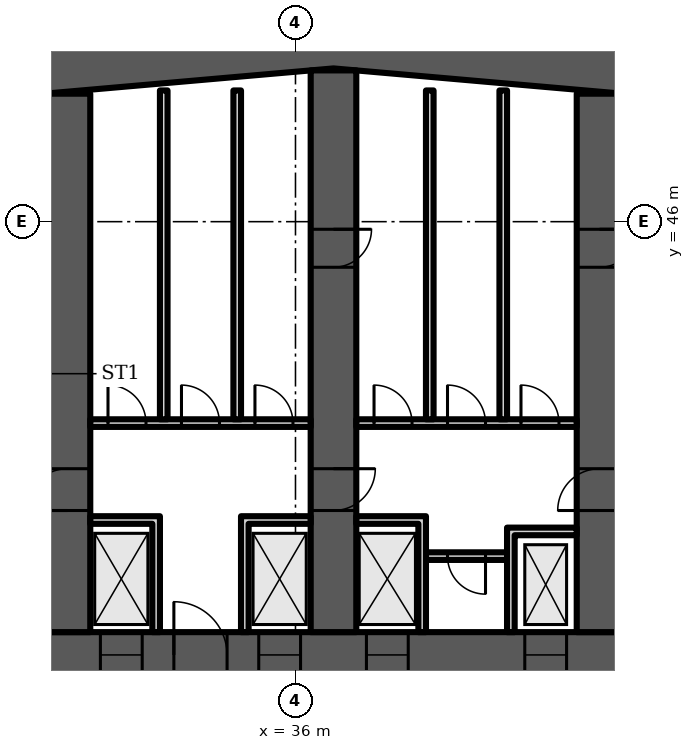
"""IFC4 building model, lengths in metres.
Left out: names, types, materials, properties, quantities, classifications, styles, units other than length and angle.
Written with IfcOpenShell. Run it as: python <this file> out.ifc"""

import sys

from ifc_helpers import new_model, si_unit, direction, frame, frame_2d, origin, place, context, subcontext, project, spatial, polyline, rectangle, outline, extrude, element, fill, save


model = new_model("IFC4")
c1 = context("Model", 3, precision=1e-05, world=origin(), true_north=direction((0.0, 1.0)))
c2 = subcontext(c1, "Body", "Model", "MODEL_VIEW")
j1 = project(units=[si_unit("LENGTHUNIT", "METRE"), si_unit("PLANEANGLEUNIT", "RADIAN")], contexts=[c1])
p1 = place(None, origin())
s1 = spatial("IfcSite", under=j1, at=p1, CompositionType="ELEMENT")
p2 = place(p1, origin())
s2 = spatial("IfcBuilding", under=s1, at=p2, CompositionType="ELEMENT")
p3 = place(p2, frame((0.0, 0.0, 73.9)))
s3 = spatial("IfcBuildingStorey", under=s2, at=p3, CompositionType="ELEMENT", Elevation=73.9)
p4 = place(p3, origin())
e1 = element("IfcWall", 1, at=p4, inside=s3, PredefinedType="SHEAR", context=c2, shape_type="SweptSolid", body=[
    extrude(outline(polyline([(9.0, 47.583), (37.0, 50.032), (65.0, 47.583), (65.0, 48.787), (37.0, 51.237), (9.0, 48.787), (9.0, 47.583)])), origin(), (0.0, 0.0, 1.0), 3.6),
])
p5 = place(p3, frame((9.0, 34.6, 0.0), z_axis=(0.0, 0.0, 1.0), x_axis=(1.0, 0.0, 0.0)))
e2 = element("IfcWall", 2, at=p5, inside=s3, PredefinedType="SHEAR", context=c2, shape_type="SweptSolid", body=[
    extrude(rectangle(XDim=56.0, YDim=1.2, at=frame_2d((28.0, 0.0))), origin(), (0.0, 0.0, 1.0), 3.6),
])
p6 = place(p5, frame((2.0, 0.0, 0.0)))
e3 = element("IfcOpeningElement", 3, at=p6, cuts=e2, PredefinedType="OPENING", context=c2, shape_type="SweptSolid", body=[
    extrude(rectangle(XDim=1.0, YDim=2.1, at=frame_2d((0.5, 1.05))), frame((0.0, 0.61, 0.0), z_axis=(0.0, -1.0, 0.0), x_axis=(1.0, 0.0, 0.0)), (0.0, 0.0, 1.0), 1.22),
])
p7 = place(p5, frame((4.6, 0.0, 0.0)))
e4 = element("IfcOpeningElement", 4, at=p7, cuts=e2, PredefinedType="OPENING", context=c2, shape_type="SweptSolid", body=[
    extrude(rectangle(XDim=1.0, YDim=2.1, at=frame_2d((0.5, 1.05))), frame((0.0, 0.61, 0.0), z_axis=(0.0, -1.0, 0.0), x_axis=(1.0, 0.0, 0.0)), (0.0, 0.0, 1.0), 1.22),
])
p8 = place(p5, frame((7.867, 0.0, 0.0)))
e5 = element("IfcOpeningElement", 5, at=p8, cuts=e2, PredefinedType="OPENING", context=c2, shape_type="SweptSolid", body=[
    extrude(rectangle(XDim=1.1, YDim=2.1, at=frame_2d((0.55, 1.05))), frame((0.0, 0.61, 0.0), z_axis=(0.0, -1.0, 0.0), x_axis=(1.0, 0.0, 0.0)), (0.0, 0.0, 1.0), 1.22),
])
p9 = place(p5, frame((12.033, 0.0, 0.0)))
e6 = element("IfcOpeningElement", 6, at=p9, cuts=e2, PredefinedType="OPENING", context=c2, shape_type="SweptSolid", body=[
    extrude(rectangle(XDim=1.1, YDim=2.1, at=frame_2d((0.55, 1.05))), frame((0.0, 0.61, 0.0), z_axis=(0.0, -1.0, 0.0), x_axis=(1.0, 0.0, 0.0)), (0.0, 0.0, 1.0), 1.22),
])
p10 = place(p5, frame((9.8, 0.0, 0.0)))
e7 = element("IfcOpeningElement", 7, at=p10, cuts=e2, PredefinedType="OPENING", context=c2, shape_type="SweptSolid", body=[
    extrude(rectangle(XDim=1.4, YDim=2.1, at=frame_2d((0.7, 1.05))), frame((0.0, 0.61, 0.0), z_axis=(0.0, -1.0, 0.0), x_axis=(1.0, 0.0, 0.0)), (0.0, 0.0, 1.0), 1.22),
])
p11 = place(p5, frame((14.65, 0.0, 0.0)))
e8 = element("IfcOpeningElement", 8, at=p11, cuts=e2, PredefinedType="OPENING", context=c2, shape_type="SweptSolid", body=[
    extrude(rectangle(XDim=1.2, YDim=2.1, at=frame_2d((0.6, 1.05))), frame((0.0, 0.61, 0.0), z_axis=(0.0, -1.0, 0.0), x_axis=(1.0, 0.0, 0.0)), (0.0, 0.0, 1.0), 1.22),
])
p12 = place(p5, frame((21.867, 0.0, 0.0)))
e9 = element("IfcOpeningElement", 9, at=p12, cuts=e2, PredefinedType="OPENING", context=c2, shape_type="SweptSolid", body=[
    extrude(rectangle(XDim=1.1, YDim=2.1, at=frame_2d((0.55, 1.05))), frame((0.0, 0.61, 0.0), z_axis=(0.0, -1.0, 0.0), x_axis=(1.0, 0.0, 0.0)), (0.0, 0.0, 1.0), 1.22),
])
p13 = place(p5, frame((26.033, 0.0, 0.0)))
e10 = element("IfcOpeningElement", 10, at=p13, cuts=e2, PredefinedType="OPENING", context=c2, shape_type="SweptSolid", body=[
    extrude(rectangle(XDim=1.1, YDim=2.1, at=frame_2d((0.55, 1.05))), frame((0.0, 0.61, 0.0), z_axis=(0.0, -1.0, 0.0), x_axis=(1.0, 0.0, 0.0)), (0.0, 0.0, 1.0), 1.22),
])
p14 = place(p5, frame((23.8, 0.0, 0.0)))
e11 = element("IfcOpeningElement", 11, at=p14, cuts=e2, PredefinedType="OPENING", context=c2, shape_type="SweptSolid", body=[
    extrude(rectangle(XDim=1.4, YDim=2.1, at=frame_2d((0.7, 1.05))), frame((0.0, 0.61, 0.0), z_axis=(0.0, -1.0, 0.0), x_axis=(1.0, 0.0, 0.0)), (0.0, 0.0, 1.0), 1.22),
])
p15 = place(p5, frame((28.867, 0.0, 0.0)))
e12 = element("IfcOpeningElement", 12, at=p15, cuts=e2, PredefinedType="OPENING", context=c2, shape_type="SweptSolid", body=[
    extrude(rectangle(XDim=1.1, YDim=2.1, at=frame_2d((0.55, 1.05))), frame((0.0, 0.61, 0.0), z_axis=(0.0, -1.0, 0.0), x_axis=(1.0, 0.0, 0.0)), (0.0, 0.0, 1.0), 1.22),
])
p16 = place(p5, frame((33.033, 0.0, 0.0)))
e13 = element("IfcOpeningElement", 13, at=p16, cuts=e2, PredefinedType="OPENING", context=c2, shape_type="SweptSolid", body=[
    extrude(rectangle(XDim=1.1, YDim=2.1, at=frame_2d((0.55, 1.05))), frame((0.0, 0.61, 0.0), z_axis=(0.0, -1.0, 0.0), x_axis=(1.0, 0.0, 0.0)), (0.0, 0.0, 1.0), 1.22),
])
p17 = place(p5, frame((40.15, 0.0, 0.0)))
e14 = element("IfcOpeningElement", 14, at=p17, cuts=e2, PredefinedType="OPENING", context=c2, shape_type="SweptSolid", body=[
    extrude(rectangle(XDim=1.2, YDim=2.1, at=frame_2d((0.6, 1.05))), frame((0.0, 0.61, 0.0), z_axis=(0.0, -1.0, 0.0), x_axis=(1.0, 0.0, 0.0)), (0.0, 0.0, 1.0), 1.22),
])
p18 = place(p5, frame((44.8, 0.0, 0.0)))
e15 = element("IfcOpeningElement", 15, at=p18, cuts=e2, PredefinedType="OPENING", context=c2, shape_type="SweptSolid", body=[
    extrude(rectangle(XDim=1.4, YDim=2.1, at=frame_2d((0.7, 1.05))), frame((0.0, 0.61, 0.0), z_axis=(0.0, -1.0, 0.0), x_axis=(1.0, 0.0, 0.0)), (0.0, 0.0, 1.0), 1.22),
])
p19 = place(p5, frame((49.867, 0.0, 0.0)))
e16 = element("IfcOpeningElement", 16, at=p19, cuts=e2, PredefinedType="OPENING", context=c2, shape_type="SweptSolid", body=[
    extrude(rectangle(XDim=1.1, YDim=2.1, at=frame_2d((0.55, 1.05))), frame((0.0, 0.61, 0.0), z_axis=(0.0, -1.0, 0.0), x_axis=(1.0, 0.0, 0.0)), (0.0, 0.0, 1.0), 1.22),
])
p20 = place(p5, frame((53.5, 0.0, 0.0)))
e17 = element("IfcOpeningElement", 17, at=p20, cuts=e2, PredefinedType="OPENING", context=c2, shape_type="SweptSolid", body=[
    extrude(rectangle(XDim=1.1, YDim=2.1, at=frame_2d((0.55, 1.05))), frame((0.0, 0.61, 0.0), z_axis=(0.0, -1.0, 0.0), x_axis=(1.0, 0.0, 0.0)), (0.0, 0.0, 1.0), 1.22),
])
p21 = place(p5, frame((51.567, 0.0, 0.0)))
e18 = element("IfcOpeningElement", 18, at=p21, cuts=e2, PredefinedType="OPENING", context=c2, shape_type="SweptSolid", body=[
    extrude(rectangle(XDim=1.4, YDim=2.1, at=frame_2d((0.7, 1.05))), frame((0.0, 0.61, 0.0), z_axis=(0.0, -1.0, 0.0), x_axis=(1.0, 0.0, 0.0)), (0.0, 0.0, 1.0), 1.22),
])
p22 = place(p3, frame((30.0, 35.2, 0.0), z_axis=(0.0, 0.0, 1.0), x_axis=(0.0, 1.0, 0.0)))
e19 = element("IfcWall", 19, at=p22, inside=s3, PredefinedType="SHEAR", context=c2, shape_type="SweptSolid", body=[
    extrude(rectangle(XDim=14.168, YDim=1.2, at=frame_2d((7.084, 0.0))), origin(), (0.0, 0.0, 1.0), 3.6),
])
p23 = place(p22, frame((3.2, 0.0, 0.0)))
e20 = element("IfcOpeningElement", 20, at=p23, cuts=e19, PredefinedType="OPENING", context=c2, shape_type="SweptSolid", body=[
    extrude(rectangle(XDim=1.1, YDim=2.1, at=frame_2d((0.55, 1.05))), frame((0.0, 0.61, 0.0), z_axis=(0.0, -1.0, 0.0), x_axis=(1.0, 0.0, 0.0)), (0.0, 0.0, 1.0), 1.22),
])
p24 = place(p3, frame((37.0, 35.2, 0.0), z_axis=(0.0, 0.0, 1.0), x_axis=(0.0, 1.0, 0.0)))
e21 = element("IfcWall", 21, at=p24, inside=s3, PredefinedType="SHEAR", context=c2, shape_type="SweptSolid", body=[
    extrude(rectangle(XDim=14.78, YDim=1.2, at=frame_2d((7.39, 0.0))), origin(), (0.0, 0.0, 1.0), 3.6),
])
p25 = place(p24, frame((3.2, 0.0, 0.0)))
e22 = element("IfcOpeningElement", 22, at=p25, cuts=e21, PredefinedType="OPENING", context=c2, shape_type="SweptSolid", body=[
    extrude(rectangle(XDim=1.1, YDim=2.1, at=frame_2d((0.55, 1.05))), frame((0.0, 0.61, 0.0), z_axis=(0.0, -1.0, 0.0), x_axis=(1.0, 0.0, 0.0)), (0.0, 0.0, 1.0), 1.22),
])
p26 = place(p24, frame((9.6, 0.0, 0.0)))
e23 = element("IfcOpeningElement", 23, at=p26, cuts=e21, PredefinedType="OPENING", context=c2, shape_type="SweptSolid", body=[
    extrude(rectangle(XDim=1.0, YDim=2.1, at=frame_2d((0.5, 1.05))), frame((0.0, 0.61, 0.0), z_axis=(0.0, -1.0, 0.0), x_axis=(1.0, 0.0, 0.0)), (0.0, 0.0, 1.0), 1.22),
])
p27 = place(p3, frame((44.0, 35.2, 0.0), z_axis=(0.0, 0.0, 1.0), x_axis=(0.0, 1.0, 0.0)))
e24 = element("IfcWall", 24, at=p27, inside=s3, PredefinedType="SHEAR", context=c2, shape_type="SweptSolid", body=[
    extrude(rectangle(XDim=14.168, YDim=1.2, at=frame_2d((7.084, 0.0))), origin(), (0.0, 0.0, 1.0), 3.6),
])
p28 = place(p27, frame((3.2, 0.0, 0.0)))
e25 = element("IfcOpeningElement", 25, at=p28, cuts=e24, PredefinedType="OPENING", context=c2, shape_type="SweptSolid", body=[
    extrude(rectangle(XDim=1.1, YDim=2.1, at=frame_2d((0.55, 1.05))), frame((0.0, 0.61, 0.0), z_axis=(0.0, -1.0, 0.0), x_axis=(1.0, 0.0, 0.0)), (0.0, 0.0, 1.0), 1.22),
])
p29 = place(p27, frame((9.6, 0.0, 0.0)))
e26 = element("IfcOpeningElement", 26, at=p29, cuts=e24, PredefinedType="OPENING", context=c2, shape_type="SweptSolid", body=[
    extrude(rectangle(XDim=1.0, YDim=2.1, at=frame_2d((0.5, 1.05))), frame((0.0, 0.61, 0.0), z_axis=(0.0, -1.0, 0.0), x_axis=(1.0, 0.0, 0.0)), (0.0, 0.0, 1.0), 1.22),
])
p30 = place(p3, frame((30.6, 40.7, 0.0), z_axis=(0.0, 0.0, 1.0), x_axis=(1.0, 0.0, 0.0)))
e27 = element("IfcWall", 27, at=p30, inside=s3, PredefinedType="PARTITIONING", context=c2, shape_type="SweptSolid", body=[
    extrude(rectangle(XDim=5.8, YDim=0.2, at=frame_2d((2.9, 0.0))), origin(), (0.0, 0.0, 1.0), 3.2),
])
p31 = place(p30, frame((0.467, 0.0, 0.0)))
e28 = element("IfcOpeningElement", 28, at=p31, cuts=e27, PredefinedType="OPENING", context=c2, shape_type="SweptSolid", body=[
    extrude(rectangle(XDim=1.0, YDim=2.1, at=frame_2d((0.5, 1.05))), frame((0.0, 0.11, 0.0), z_axis=(0.0, -1.0, 0.0), x_axis=(1.0, 0.0, 0.0)), (0.0, 0.0, 1.0), 0.22),
])
p32 = place(p30, frame((2.4, 0.0, 0.0)))
e29 = element("IfcOpeningElement", 29, at=p32, cuts=e27, PredefinedType="OPENING", context=c2, shape_type="SweptSolid", body=[
    extrude(rectangle(XDim=1.0, YDim=2.1, at=frame_2d((0.5, 1.05))), frame((0.0, 0.11, 0.0), z_axis=(0.0, -1.0, 0.0), x_axis=(1.0, 0.0, 0.0)), (0.0, 0.0, 1.0), 0.22),
])
p33 = place(p30, frame((4.333, 0.0, 0.0)))
e30 = element("IfcOpeningElement", 30, at=p33, cuts=e27, PredefinedType="OPENING", context=c2, shape_type="SweptSolid", body=[
    extrude(rectangle(XDim=1.0, YDim=2.1, at=frame_2d((0.5, 1.05))), frame((0.0, 0.11, 0.0), z_axis=(0.0, -1.0, 0.0), x_axis=(1.0, 0.0, 0.0)), (0.0, 0.0, 1.0), 0.22),
])
p34 = place(p3, origin())
e31 = element("IfcWall", 31, at=p34, inside=s3, PredefinedType="PARTITIONING", context=c2, shape_type="SweptSolid", body=[
    extrude(outline(polyline([(32.233, 38.05), (30.6, 38.05), (30.6, 38.25), (32.233, 38.25), (32.433, 38.25), (32.433, 35.2), (32.233, 35.2), (32.233, 38.05)])), origin(), (0.0, 0.0, 1.0), 3.2),
])
p35 = place(p3, origin())
e32 = element("IfcWall", 32, at=p35, inside=s3, PredefinedType="PARTITIONING", context=c2, shape_type="SweptSolid", body=[
    extrude(outline(polyline([(34.567, 38.25), (34.767, 38.25), (36.4, 38.25), (36.4, 38.05), (34.767, 38.05), (34.767, 35.2), (34.567, 35.2), (34.567, 38.25)])), origin(), (0.0, 0.0, 1.0), 3.2),
])
for number, where, z_axis, x_axis in (
    (33, (32.533, 40.8, 0.0), (0.0, 0.0, 1.0), (0.0, 1.0, 0.0)),
    (34, (34.467, 40.8, 0.0), (0.0, 0.0, 1.0), (0.0, 1.0, 0.0)),
):
    element("IfcWall", number, at=place(p3, frame(where, z_axis=z_axis, x_axis=x_axis)), inside=s3, PredefinedType="PARTITIONING", context=c2, shape_type="SweptSolid", body=[
        extrude(rectangle(XDim=8.653, YDim=0.2, at=frame_2d((4.326, 0.0))), origin(), (0.0, 0.0, 1.0), 3.2),
    ])
p36 = place(p3, frame((39.433, 37.2, 0.0), z_axis=(0.0, 0.0, 1.0), x_axis=(1.0, 0.0, 0.0)))
e35 = element("IfcWall", 35, at=p36, inside=s3, PredefinedType="PARTITIONING", context=c2, shape_type="SweptSolid", body=[
    extrude(rectangle(XDim=2.133, YDim=0.2, at=frame_2d((1.067, 0.0))), origin(), (0.0, 0.0, 1.0), 3.2),
])
p37 = place(p36, frame((0.567, 0.0, 0.0)))
e36 = element("IfcOpeningElement", 36, at=p37, cuts=e35, PredefinedType="OPENING", context=c2, shape_type="SweptSolid", body=[
    extrude(rectangle(XDim=1.0, YDim=2.1, at=frame_2d((0.5, 1.05))), frame((0.0, 0.11, 0.0), z_axis=(0.0, -1.0, 0.0), x_axis=(1.0, 0.0, 0.0)), (0.0, 0.0, 1.0), 0.22),
])
p38 = place(p3, frame((37.6, 40.7, 0.0), z_axis=(0.0, 0.0, 1.0), x_axis=(1.0, 0.0, 0.0)))
e37 = element("IfcWall", 37, at=p38, inside=s3, PredefinedType="PARTITIONING", context=c2, shape_type="SweptSolid", body=[
    extrude(rectangle(XDim=5.8, YDim=0.2, at=frame_2d((2.9, 0.0))), origin(), (0.0, 0.0, 1.0), 3.2),
])
p39 = place(p38, frame((0.467, 0.0, 0.0)))
e38 = element("IfcOpeningElement", 38, at=p39, cuts=e37, PredefinedType="OPENING", context=c2, shape_type="SweptSolid", body=[
    extrude(rectangle(XDim=1.0, YDim=2.1, at=frame_2d((0.5, 1.05))), frame((0.0, 0.11, 0.0), z_axis=(0.0, -1.0, 0.0), x_axis=(1.0, 0.0, 0.0)), (0.0, 0.0, 1.0), 0.22),
])
p40 = place(p38, frame((2.4, 0.0, 0.0)))
e39 = element("IfcOpeningElement", 39, at=p40, cuts=e37, PredefinedType="OPENING", context=c2, shape_type="SweptSolid", body=[
    extrude(rectangle(XDim=1.0, YDim=2.1, at=frame_2d((0.5, 1.05))), frame((0.0, 0.11, 0.0), z_axis=(0.0, -1.0, 0.0), x_axis=(1.0, 0.0, 0.0)), (0.0, 0.0, 1.0), 0.22),
])
p41 = place(p38, frame((4.333, 0.0, 0.0)))
e40 = element("IfcOpeningElement", 40, at=p41, cuts=e37, PredefinedType="OPENING", context=c2, shape_type="SweptSolid", body=[
    extrude(rectangle(XDim=1.0, YDim=2.1, at=frame_2d((0.5, 1.05))), frame((0.0, 0.11, 0.0), z_axis=(0.0, -1.0, 0.0), x_axis=(1.0, 0.0, 0.0)), (0.0, 0.0, 1.0), 0.22),
])
p42 = place(p3, origin())
e41 = element("IfcWall", 41, at=p42, inside=s3, PredefinedType="PARTITIONING", context=c2, shape_type="SweptSolid", body=[
    extrude(outline(polyline([(41.567, 37.95), (41.767, 37.95), (43.4, 37.95), (43.4, 37.75), (41.767, 37.75), (41.767, 35.2), (41.567, 35.2), (41.567, 37.95)])), origin(), (0.0, 0.0, 1.0), 3.2),
])
p43 = place(p3, origin())
e42 = element("IfcWall", 42, at=p43, inside=s3, PredefinedType="PARTITIONING", context=c2, shape_type="SweptSolid", body=[
    extrude(outline(polyline([(39.233, 38.05), (37.6, 38.05), (37.6, 38.25), (39.233, 38.25), (39.433, 38.25), (39.433, 35.2), (39.233, 35.2), (39.233, 38.05)])), origin(), (0.0, 0.0, 1.0), 3.2),
])
for number, where, z_axis, x_axis in (
    (43, (39.533, 40.8, 0.0), (0.0, 0.0, 1.0), (0.0, 1.0, 0.0)),
    (44, (41.467, 40.8, 0.0), (0.0, 0.0, 1.0), (0.0, 1.0, 0.0)),
):
    element("IfcWall", number, at=place(p3, frame(where, z_axis=z_axis, x_axis=x_axis)), inside=s3, PredefinedType="PARTITIONING", context=c2, shape_type="SweptSolid", body=[
        extrude(rectangle(XDim=8.653, YDim=0.2, at=frame_2d((4.326, 0.0))), origin(), (0.0, 0.0, 1.0), 3.2),
    ])
p44 = place(p12, origin())
e45 = element("IfcDoor", 45, at=p44, inside=s3, OperationType="DOUBLE_DOOR_SLIDING", PredefinedType="DOOR", context=c2, shape_type="SweptSolid", body=[
    extrude(rectangle(XDim=1.1, YDim=2.1, at=frame_2d((0.55, 1.05))), frame((0.0, 0.025, 0.0), z_axis=(0.0, -1.0, 0.0), x_axis=(1.0, 0.0, 0.0)), (0.0, 0.0, 1.0), 0.05),
])
fill(e9, e45)
p45 = place(p13, origin())
e46 = element("IfcDoor", 46, at=p45, inside=s3, OperationType="DOUBLE_DOOR_SLIDING", PredefinedType="DOOR", context=c2, shape_type="SweptSolid", body=[
    extrude(rectangle(XDim=1.1, YDim=2.1, at=frame_2d((0.55, 1.05))), frame((0.0, 0.025, 0.0), z_axis=(0.0, -1.0, 0.0), x_axis=(1.0, 0.0, 0.0)), (0.0, 0.0, 1.0), 0.05),
])
fill(e10, e46)
p46 = place(p14, origin())
e47 = element("IfcDoor", 47, at=p46, inside=s3, OperationType="DOUBLE_DOOR_SINGLE_SWING", PredefinedType="DOOR", context=c2, shape_type="SweptSolid", body=[
    extrude(rectangle(XDim=1.4, YDim=2.1, at=frame_2d((0.7, 1.05))), frame((0.0, 0.025, 0.0), z_axis=(0.0, -1.0, 0.0), x_axis=(1.0, 0.0, 0.0)), (0.0, 0.0, 1.0), 0.05),
])
fill(e11, e47)
p47 = place(p31, origin())
e48 = element("IfcDoor", 48, at=p47, inside=s3, OperationType="SINGLE_SWING_LEFT", PredefinedType="DOOR", context=c2, shape_type="SweptSolid", body=[
    extrude(rectangle(XDim=1.0, YDim=2.1, at=frame_2d((0.5, 1.05))), frame((0.0, 0.025, 0.0), z_axis=(0.0, -1.0, 0.0), x_axis=(1.0, 0.0, 0.0)), (0.0, 0.0, 1.0), 0.05),
])
fill(e28, e48)
p48 = place(p32, origin())
e49 = element("IfcDoor", 49, at=p48, inside=s3, OperationType="SINGLE_SWING_LEFT", PredefinedType="DOOR", context=c2, shape_type="SweptSolid", body=[
    extrude(rectangle(XDim=1.0, YDim=2.1, at=frame_2d((0.5, 1.05))), frame((0.0, 0.025, 0.0), z_axis=(0.0, -1.0, 0.0), x_axis=(1.0, 0.0, 0.0)), (0.0, 0.0, 1.0), 0.05),
])
fill(e29, e49)
p49 = place(p33, origin())
e50 = element("IfcDoor", 50, at=p49, inside=s3, OperationType="SINGLE_SWING_LEFT", PredefinedType="DOOR", context=c2, shape_type="SweptSolid", body=[
    extrude(rectangle(XDim=1.0, YDim=2.1, at=frame_2d((0.5, 1.05))), frame((0.0, 0.025, 0.0), z_axis=(0.0, -1.0, 0.0), x_axis=(1.0, 0.0, 0.0)), (0.0, 0.0, 1.0), 0.05),
])
fill(e30, e50)
p50 = place(p37, origin())
e51 = element("IfcDoor", 51, at=p50, inside=s3, OperationType="SINGLE_SWING_RIGHT", PredefinedType="DOOR", context=c2, shape_type="SweptSolid", body=[
    extrude(rectangle(XDim=1.0, YDim=2.1, at=frame_2d((0.5, 1.05))), frame((0.0, 0.025, 0.0), z_axis=(0.0, -1.0, 0.0), x_axis=(1.0, 0.0, 0.0)), (0.0, 0.0, 1.0), 0.05),
])
fill(e36, e51)
p51 = place(p15, origin())
e52 = element("IfcDoor", 52, at=p51, inside=s3, OperationType="DOUBLE_DOOR_SLIDING", PredefinedType="DOOR", context=c2, shape_type="SweptSolid", body=[
    extrude(rectangle(XDim=1.1, YDim=2.1, at=frame_2d((0.55, 1.05))), frame((0.0, 0.025, 0.0), z_axis=(0.0, -1.0, 0.0), x_axis=(1.0, 0.0, 0.0)), (0.0, 0.0, 1.0), 0.05),
])
fill(e12, e52)
p52 = place(p16, origin())
e53 = element("IfcDoor", 53, at=p52, inside=s3, OperationType="DOUBLE_DOOR_SLIDING", PredefinedType="DOOR", context=c2, shape_type="SweptSolid", body=[
    extrude(rectangle(XDim=1.1, YDim=2.1, at=frame_2d((0.55, 1.05))), frame((0.0, 0.025, 0.0), z_axis=(0.0, -1.0, 0.0), x_axis=(1.0, 0.0, 0.0)), (0.0, 0.0, 1.0), 0.05),
])
fill(e13, e53)
p53 = place(p39, origin())
e54 = element("IfcDoor", 54, at=p53, inside=s3, OperationType="SINGLE_SWING_LEFT", PredefinedType="DOOR", context=c2, shape_type="SweptSolid", body=[
    extrude(rectangle(XDim=1.0, YDim=2.1, at=frame_2d((0.5, 1.05))), frame((0.0, 0.025, 0.0), z_axis=(0.0, -1.0, 0.0), x_axis=(1.0, 0.0, 0.0)), (0.0, 0.0, 1.0), 0.05),
])
fill(e38, e54)
p54 = place(p40, origin())
e55 = element("IfcDoor", 55, at=p54, inside=s3, OperationType="SINGLE_SWING_LEFT", PredefinedType="DOOR", context=c2, shape_type="SweptSolid", body=[
    extrude(rectangle(XDim=1.0, YDim=2.1, at=frame_2d((0.5, 1.05))), frame((0.0, 0.025, 0.0), z_axis=(0.0, -1.0, 0.0), x_axis=(1.0, 0.0, 0.0)), (0.0, 0.0, 1.0), 0.05),
])
fill(e39, e55)
p55 = place(p41, origin())
e56 = element("IfcDoor", 56, at=p55, inside=s3, OperationType="SINGLE_SWING_LEFT", PredefinedType="DOOR", context=c2, shape_type="SweptSolid", body=[
    extrude(rectangle(XDim=1.0, YDim=2.1, at=frame_2d((0.5, 1.05))), frame((0.0, 0.025, 0.0), z_axis=(0.0, -1.0, 0.0), x_axis=(1.0, 0.0, 0.0)), (0.0, 0.0, 1.0), 0.05),
])
fill(e40, e56)
p56 = place(p23, origin())
e57 = element("IfcDoor", 57, at=p56, inside=s3, OperationType="SINGLE_SWING_LEFT", PredefinedType="DOOR", context=c2, shape_type="SweptSolid", body=[
    extrude(rectangle(XDim=1.1, YDim=2.1, at=frame_2d((0.55, 1.05))), frame((0.0, 0.025, 0.0), z_axis=(0.0, -1.0, 0.0), x_axis=(1.0, 0.0, 0.0)), (0.0, 0.0, 1.0), 0.05),
])
fill(e20, e57)
p57 = place(p25, origin())
e58 = element("IfcDoor", 58, at=p57, inside=s3, OperationType="SINGLE_SWING_RIGHT", PredefinedType="DOOR", context=c2, shape_type="SweptSolid", body=[
    extrude(rectangle(XDim=1.1, YDim=2.1, at=frame_2d((0.55, 1.05))), frame((0.0, 0.025, 0.0), z_axis=(0.0, -1.0, 0.0), x_axis=(1.0, 0.0, 0.0)), (0.0, 0.0, 1.0), 0.05),
])
fill(e22, e58)
p58 = place(p26, origin())
e59 = element("IfcDoor", 59, at=p58, inside=s3, OperationType="SINGLE_SWING_RIGHT", PredefinedType="DOOR", context=c2, shape_type="SweptSolid", body=[
    extrude(rectangle(XDim=1.0, YDim=2.1, at=frame_2d((0.5, 1.05))), frame((0.0, 0.6, 0.0), z_axis=(0.0, -1.0, 0.0), x_axis=(1.0, 0.0, 0.0)), (0.0, 0.0, 1.0), 1.199),
])
fill(e23, e59)
p59 = place(p28, origin())
e60 = element("IfcDoor", 60, at=p59, inside=s3, OperationType="SINGLE_SWING_LEFT", PredefinedType="DOOR", context=c2, shape_type="SweptSolid", body=[
    extrude(rectangle(XDim=1.1, YDim=2.1, at=frame_2d((0.55, 1.05))), frame((0.0, 0.025, 0.0), z_axis=(0.0, -1.0, 0.0), x_axis=(1.0, 0.0, 0.0)), (0.0, 0.0, 1.0), 0.05),
])
fill(e25, e60)
p60 = place(p29, origin())
e61 = element("IfcDoor", 61, at=p60, inside=s3, OperationType="SINGLE_SWING_RIGHT", PredefinedType="DOOR", context=c2, shape_type="SweptSolid", body=[
    extrude(rectangle(XDim=1.0, YDim=2.1, at=frame_2d((0.5, 1.05))), frame((0.0, 0.6, 0.0), z_axis=(0.0, -1.0, 0.0), x_axis=(1.0, 0.0, 0.0)), (0.0, 0.0, 1.0), 1.199),
])
fill(e26, e61)
save(model, sys.argv[1])
